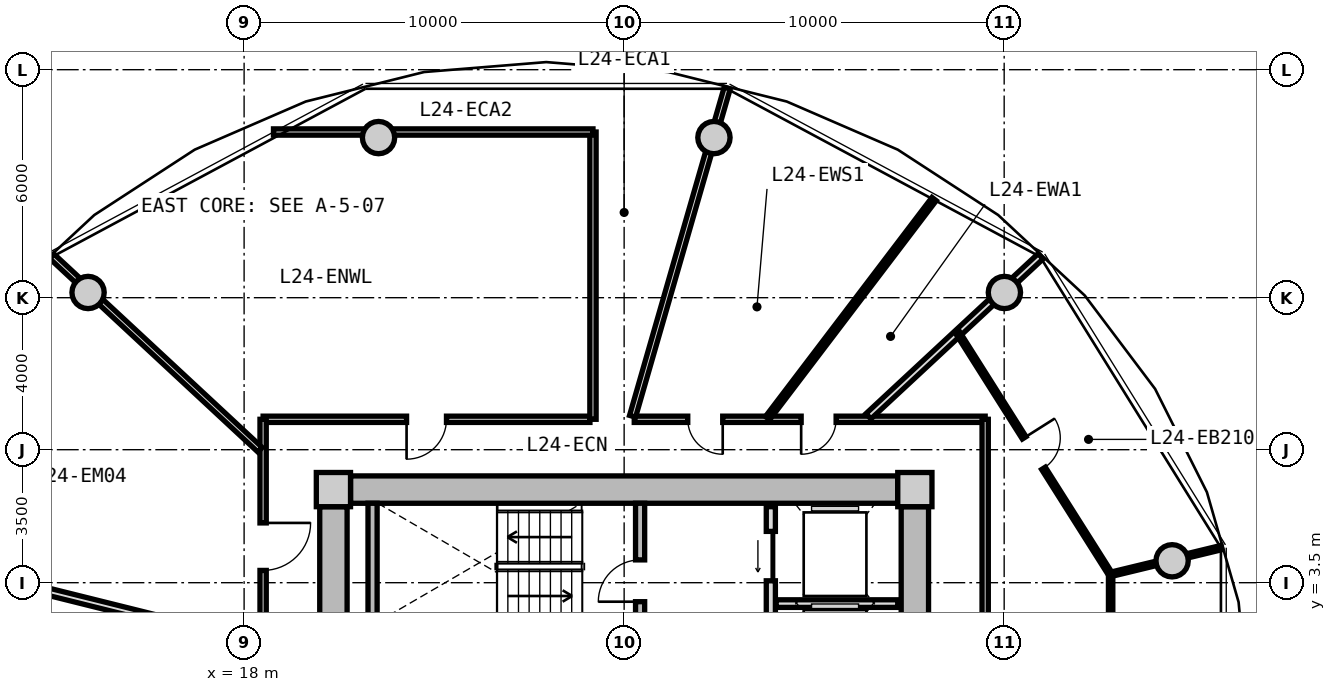
"""IFC4 building model, lengths in metres.
Left out: names, types, materials, properties, quantities, classifications, styles, units other than length and angle.
Written with IfcOpenShell. Run it as: python <this file> out.ifc"""

import sys

from ifc_helpers import new_model, si_unit, direction, frame, frame_2d, origin, origin_2d, place, context, subcontext, project, spatial, rectangle, circle, extrude, source, transform, mapped, element, fill, save


model = new_model("IFC4")
c1 = context("Model", 3, precision=1e-05, world=origin(), true_north=direction((0.0, 1.0)))
c2 = subcontext(c1, "Body", "Model", "MODEL_VIEW")
j1 = project(units=[si_unit("LENGTHUNIT", "METRE"), si_unit("PLANEANGLEUNIT", "RADIAN")], contexts=[c1])
p1 = place(None, origin())
s1 = spatial("IfcSite", under=j1, at=p1, CompositionType="ELEMENT")
p2 = place(p1, origin())
s2 = spatial("IfcBuilding", under=s1, at=p2, CompositionType="ELEMENT")
p3 = place(p2, frame((0.0, 0.0, 81.0)))
s3 = spatial("IfcBuildingStorey", under=s2, at=p3, CompositionType="ELEMENT", Elevation=81.0)
m1 = source(origin(), c2, "Body", "SweptSolid", [
    extrude(rectangle(XDim=0.9, YDim=0.9, at=origin_2d()), origin(), (0.0, 0.0, 1.0), 3.05),
])
for number, where, z_axis, x_axis in (
    (1, (35.65, 5.95, 0.0), (0.0, 0.0, 1.0), (1.0, 0.0, 0.0)),
    (2, (20.35, 5.95, 0.0), (0.0, 0.0, 1.0), (1.0, 0.0, 0.0)),
):
    element("IfcColumn", number, at=place(p3, frame(where, z_axis=z_axis, x_axis=x_axis)), inside=s3, PredefinedType="COLUMN", context=c2, shape_type="MappedRepresentation", body=[
        mapped(m1, transform((0.0, 0.0, 0.0), x_axis=(1.0, 0.0, 0.0), y_axis=(0.0, 1.0, 0.0), z_axis=(0.0, 0.0, 1.0), scale=1.0)),
    ])
m2 = source(origin(), c2, "Body", "SweptSolid", [
    extrude(rectangle(XDim=14.4, YDim=0.72, at=frame_2d((7.2, 0.0))), origin(), (0.0, 0.0, 1.0), 2.79),
])
p4 = place(p3, frame((20.8, 5.95, 0.0), z_axis=(0.0, 0.0, 1.0), x_axis=(1.0, 0.0, 0.0)))
e3 = element("IfcWall", 3, at=p4, inside=s3, PredefinedType="SHEAR", context=c2, shape_type="MappedRepresentation", body=[
    mapped(m2, transform((0.0, 0.0, 0.0), x_axis=(1.0, 0.0, 0.0), y_axis=(0.0, 1.0, 0.0), z_axis=(0.0, 0.0, 1.0), scale=1.0)),
])
m3 = source(origin(), c2, "Body", "SweptSolid", [
    extrude(rectangle(XDim=11.0, YDim=0.72, at=frame_2d((5.5, 0.0))), origin(), (0.0, 0.0, 1.0), 2.79),
])
p5 = place(p3, frame((20.35, -5.5, 0.0), z_axis=(0.0, 0.0, 1.0), x_axis=(0.0, 1.0, 0.0)))
e4 = element("IfcWall", 4, at=p5, inside=s3, PredefinedType="SHEAR", context=c2, shape_type="MappedRepresentation", body=[
    mapped(m3, transform((0.0, 0.0, 0.0), x_axis=(1.0, 0.0, 0.0), y_axis=(0.0, 1.0, 0.0), z_axis=(0.0, 0.0, 1.0), scale=1.0)),
])
p6 = place(p5, frame((3.8, 0.0, 0.0)))
e5 = element("IfcOpeningElement", 5, at=p6, cuts=e4, PredefinedType="OPENING", context=c2, shape_type="SweptSolid", body=[
    extrude(rectangle(XDim=1.2, YDim=2.15, at=frame_2d((0.6, 1.075))), frame((0.0, 0.37, 0.0), z_axis=(0.0, -1.0, 0.0), x_axis=(1.0, 0.0, 0.0)), (0.0, 0.0, 1.0), 0.74),
])
p7 = place(p3, frame((35.65, 5.5, 0.0), z_axis=(0.0, 0.0, 1.0), x_axis=(0.0, -1.0, 0.0)))
e6 = element("IfcWall", 6, at=p7, inside=s3, PredefinedType="SHEAR", context=c2, shape_type="MappedRepresentation", body=[
    mapped(m3, transform((0.0, 0.0, 0.0), x_axis=(1.0, 0.0, 0.0), y_axis=(0.0, 1.0, 0.0), z_axis=(0.0, 0.0, 1.0), scale=1.0)),
])
p8 = place(p7, frame((5.65, 0.0, 0.0)))
e7 = element("IfcOpeningElement", 7, at=p8, cuts=e6, PredefinedType="OPENING", context=c2, shape_type="SweptSolid", body=[
    extrude(rectangle(XDim=1.2, YDim=2.15, at=frame_2d((0.6, 1.075))), frame((0.0, 0.37, 0.0), z_axis=(0.0, -1.0, 0.0), x_axis=(1.0, 0.0, 0.0)), (0.0, 0.0, 1.0), 0.74),
])
m4 = source(origin(), c2, "Body", "SweptSolid", [
    extrude(circle(Radius=0.425, at=origin_2d()), origin(), (0.0, 0.0, 1.0), 3.05),
])
for number, where, z_axis, x_axis in (
    (8, (42.419, 4.076, 0.0), (0.0, 0.0, 1.0), (1.0, 0.0, 0.0)),
    (9, (38.006, 11.137, 0.0), (0.0, 0.0, 1.0), (1.0, 0.0, 0.0)),
    (10, (30.363, 15.213, 0.0), (0.0, 0.0, 1.0), (1.0, 0.0, 0.0)),
    (11, (21.537, 15.213, 0.0), (0.0, 0.0, 1.0), (1.0, 0.0, 0.0)),
    (12, (13.894, 11.137, 0.0), (0.0, 0.0, 1.0), (1.0, 0.0, 0.0)),
):
    element("IfcColumn", number, at=place(p3, frame(where, z_axis=z_axis, x_axis=x_axis)), inside=s3, PredefinedType="COLUMN", context=c2, shape_type="MappedRepresentation", body=[
        mapped(m4, transform((0.0, 0.0, 0.0), x_axis=(1.0, 0.0, 0.0), y_axis=(0.0, 1.0, 0.0), z_axis=(0.0, 0.0, 1.0), scale=1.0)),
    ])
m5 = source(origin(), c2, "Body", "SweptSolid", [
    extrude(rectangle(XDim=3.14, YDim=0.24, at=frame_2d((1.57, 0.0))), origin(), (0.0, 0.0, 1.0), 2.79),
])
p9 = place(p3, frame((21.38, 2.45, 0.0), z_axis=(0.0, 0.0, 1.0), x_axis=(0.0, 1.0, 0.0)))
e13 = element("IfcWall", 13, at=p9, inside=s3, PredefinedType="PARTITIONING", context=c2, shape_type="MappedRepresentation", body=[
    mapped(m5, transform((0.0, 0.0, 0.0), x_axis=(1.0, 0.0, 0.0), y_axis=(0.0, 1.0, 0.0), z_axis=(0.0, 0.0, 1.0), scale=1.0)),
])
p10 = place(p3, frame((28.42, 2.45, 0.0), z_axis=(0.0, 0.0, 1.0), x_axis=(0.0, 1.0, 0.0)))
e14 = element("IfcWall", 14, at=p10, inside=s3, PredefinedType="PARTITIONING", context=c2, shape_type="MappedRepresentation", body=[
    mapped(m5, transform((0.0, 0.0, 0.0), x_axis=(1.0, 0.0, 0.0), y_axis=(0.0, 1.0, 0.0), z_axis=(0.0, 0.0, 1.0), scale=1.0)),
])
p11 = place(p10, frame((0.55, 0.0, 0.0)))
e15 = element("IfcOpeningElement", 15, at=p11, cuts=e14, PredefinedType="OPENING", context=c2, shape_type="SweptSolid", body=[
    extrude(rectangle(XDim=1.1, YDim=2.15, at=frame_2d((0.55, 1.075))), frame((0.0, 0.13, 0.0), z_axis=(0.0, -1.0, 0.0), x_axis=(1.0, 0.0, 0.0)), (0.0, 0.0, 1.0), 0.26),
])
m6 = source(origin(), c2, "Body", "SweptSolid", [
    extrude(rectangle(XDim=5.0, YDim=0.24, at=frame_2d((2.5, 0.0))), origin(), (0.0, 0.0, 1.0), 2.775),
])
p12 = place(p3, frame((31.86, 0.5, 0.0), z_axis=(0.0, 0.0, 1.0), x_axis=(0.0, 1.0, 0.0)))
e16 = element("IfcWall", 16, at=p12, inside=s3, PredefinedType="PARTITIONING", context=c2, shape_type="MappedRepresentation", body=[
    mapped(m6, transform((0.0, 0.0, 0.0), x_axis=(1.0, 0.0, 0.0), y_axis=(0.0, 1.0, 0.0), z_axis=(0.0, 0.0, 1.0), scale=1.0)),
])
p13 = place(p12, frame((3.05, 0.0, 0.0)))
e17 = element("IfcOpeningElement", 17, at=p13, cuts=e16, PredefinedType="OPENING", context=c2, shape_type="SweptSolid", body=[
    extrude(rectangle(XDim=1.3, YDim=2.2, at=frame_2d((0.65, 1.1))), frame((0.0, 0.13, 0.0), z_axis=(0.0, -1.0, 0.0), x_axis=(1.0, 0.0, 0.0)), (0.0, 0.0, 1.0), 0.26),
])
p14 = place(p12, frame((0.55, 0.0, 0.0)))
e18 = element("IfcOpeningElement", 18, at=p14, cuts=e16, PredefinedType="OPENING", context=c2, shape_type="SweptSolid", body=[
    extrude(rectangle(XDim=1.3, YDim=2.2, at=frame_2d((0.65, 1.1))), frame((0.0, 0.13, 0.0), z_axis=(0.0, -1.0, 0.0), x_axis=(1.0, 0.0, 0.0)), (0.0, 0.0, 1.0), 0.26),
])
m7 = source(origin(), c2, "Body", "SweptSolid", [
    extrude(rectangle(XDim=3.2, YDim=0.2, at=frame_2d((1.6, 0.0))), origin(), (0.0, 0.0, 1.0), 2.775),
])
p15 = place(p3, frame((32.0, 2.95, 0.0), z_axis=(0.0, 0.0, 1.0), x_axis=(1.0, 0.0, 0.0)))
e19 = element("IfcWall", 19, at=p15, inside=s3, PredefinedType="PARTITIONING", context=c2, shape_type="MappedRepresentation", body=[
    mapped(m7, transform((0.0, 0.0, 0.0), x_axis=(1.0, 0.0, 0.0), y_axis=(0.0, 1.0, 0.0), z_axis=(0.0, 0.0, 1.0), scale=1.0)),
])
m8 = source(origin(), c2, "Body", "SweptSolid", [
    extrude(rectangle(XDim=8.6, YDim=0.165, at=frame_2d((4.3, 0.0))), origin(), (0.0, 0.0, 1.0), 2.775),
])
p16 = place(p3, frame((18.5, 7.8, 0.0), z_axis=(0.0, 0.0, 1.0), x_axis=(1.0, 0.0, 0.0)))
e20 = element("IfcWall", 20, at=p16, inside=s3, PredefinedType="PARTITIONING", context=c2, shape_type="MappedRepresentation", body=[
    mapped(m8, transform((0.0, 0.0, 0.0), x_axis=(1.0, 0.0, 0.0), y_axis=(0.0, 1.0, 0.0), z_axis=(0.0, 0.0, 1.0), scale=1.0)),
])
p17 = place(p16, frame((3.775, 0.0, 0.0)))
e21 = element("IfcOpeningElement", 21, at=p17, cuts=e20, PredefinedType="OPENING", context=c2, shape_type="SweptSolid", body=[
    extrude(rectangle(XDim=1.05, YDim=2.15, at=frame_2d((0.525, 1.075))), frame((0.0, 0.093, 0.0), z_axis=(0.0, -1.0, 0.0), x_axis=(1.0, 0.0, 0.0)), (0.0, 0.0, 1.0), 0.185),
])
m9 = source(origin(), c2, "Body", "SweptSolid", [
    extrude(rectangle(XDim=9.234, YDim=0.165, at=frame_2d((4.617, 0.0))), origin(), (0.0, 0.0, 1.0), 2.775),
])
p18 = place(p3, frame((28.266, 7.8, 0.0), z_axis=(0.0, 0.0, 1.0), x_axis=(1.0, 0.0, 0.0)))
e22 = element("IfcWall", 22, at=p18, inside=s3, PredefinedType="PARTITIONING", context=c2, shape_type="MappedRepresentation", body=[
    mapped(m9, transform((0.0, 0.0, 0.0), x_axis=(1.0, 0.0, 0.0), y_axis=(0.0, 1.0, 0.0), z_axis=(0.0, 0.0, 1.0), scale=1.0)),
])
p19 = place(p18, frame((4.392, 0.0, 0.0)))
e23 = element("IfcOpeningElement", 23, at=p19, cuts=e22, PredefinedType="OPENING", context=c2, shape_type="SweptSolid", body=[
    extrude(rectangle(XDim=0.92, YDim=2.1, at=frame_2d((0.46, 1.05))), frame((0.0, 0.093, 0.0), z_axis=(0.0, -1.0, 0.0), x_axis=(1.0, 0.0, 0.0)), (0.0, 0.0, 1.0), 0.185),
])
p20 = place(p18, frame((1.408, 0.0, 0.0)))
e24 = element("IfcOpeningElement", 24, at=p20, cuts=e22, PredefinedType="OPENING", context=c2, shape_type="SweptSolid", body=[
    extrude(rectangle(XDim=0.92, YDim=2.1, at=frame_2d((0.46, 1.05))), frame((0.0, 0.093, 0.0), z_axis=(0.0, -1.0, 0.0), x_axis=(1.0, 0.0, 0.0)), (0.0, 0.0, 1.0), 0.185),
])
m10 = source(origin(), c2, "Body", "SweptSolid", [
    extrude(rectangle(XDim=15.6, YDim=0.165, at=frame_2d((7.8, 0.0))), origin(), (0.0, 0.0, 1.0), 2.775),
])
p21 = place(p3, frame((18.5, -7.8, 0.0), z_axis=(0.0, 0.0, 1.0), x_axis=(0.0, 1.0, 0.0)))
e25 = element("IfcWall", 25, at=p21, inside=s3, PredefinedType="PARTITIONING", context=c2, shape_type="MappedRepresentation", body=[
    mapped(m10, transform((0.0, 0.0, 0.0), x_axis=(1.0, 0.0, 0.0), y_axis=(0.0, 1.0, 0.0), z_axis=(0.0, 0.0, 1.0), scale=1.0)),
])
p22 = place(p21, frame((11.623, 0.0, 0.0)))
e26 = element("IfcOpeningElement", 26, at=p22, cuts=e25, PredefinedType="OPENING", context=c2, shape_type="SweptSolid", body=[
    extrude(rectangle(XDim=1.25, YDim=2.2, at=frame_2d((0.625, 1.1))), frame((0.0, 0.093, 0.0), z_axis=(0.0, -1.0, 0.0), x_axis=(1.0, 0.0, 0.0)), (0.0, 0.0, 1.0), 0.185),
])
p23 = place(p21, frame((7.175, 0.0, 0.0)))
e27 = element("IfcOpeningElement", 27, at=p23, cuts=e25, PredefinedType="OPENING", context=c2, shape_type="SweptSolid", body=[
    extrude(rectangle(XDim=1.25, YDim=2.2, at=frame_2d((0.625, 1.1))), frame((0.0, 0.093, 0.0), z_axis=(0.0, -1.0, 0.0), x_axis=(1.0, 0.0, 0.0)), (0.0, 0.0, 1.0), 0.185),
])
p24 = place(p3, frame((37.5, 7.8, 0.0), z_axis=(0.0, 0.0, 1.0), x_axis=(0.0, -1.0, 0.0)))
e28 = element("IfcWall", 28, at=p24, inside=s3, PredefinedType="PARTITIONING", context=c2, shape_type="MappedRepresentation", body=[
    mapped(m10, transform((0.0, 0.0, 0.0), x_axis=(1.0, 0.0, 0.0), y_axis=(0.0, 1.0, 0.0), z_axis=(0.0, 0.0, 1.0), scale=1.0)),
])
p25 = place(p24, frame((6.87, 0.0, 0.0)))
e29 = element("IfcOpeningElement", 29, at=p25, cuts=e28, PredefinedType="OPENING", context=c2, shape_type="SweptSolid", body=[
    extrude(rectangle(XDim=1.05, YDim=2.15, at=frame_2d((0.525, 1.075))), frame((0.0, 0.093, 0.0), z_axis=(0.0, -1.0, 0.0), x_axis=(1.0, 0.0, 0.0)), (0.0, 0.0, 1.0), 0.185),
])
m11 = source(origin(), c2, "Body", "SweptSolid", [
    extrude(rectangle(XDim=8.989, YDim=0.165, at=frame_2d((4.495, 0.0))), origin(), (0.0, 0.0, 1.0), 2.275),
])
p26 = place(p3, frame((28.222, 7.88, 0.0), z_axis=(0.0, 0.0, 1.0), x_axis=(0.27702323008, 0.960863221274, 0.0)))
e30 = element("IfcWall", 30, at=p26, inside=s3, PredefinedType="PARTITIONING", context=c2, shape_type="MappedRepresentation", body=[
    mapped(m11, transform((0.0, 0.0, 0.0), x_axis=(1.0, 0.0, 0.0), y_axis=(0.0, 1.0, 0.0), z_axis=(0.0, 0.0, 1.0), scale=1.0)),
])
m12 = source(origin(), c2, "Body", "SweptSolid", [
    extrude(rectangle(XDim=7.482, YDim=0.165, at=frame_2d((3.741, 0.0))), origin(), (0.0, 0.0, 1.0), 2.275),
])
p27 = place(p3, frame((18.42, 6.998, 0.0), z_axis=(0.0, 0.0, 1.0), x_axis=(-0.732508698043, 0.680757671489, 0.0)))
e31 = element("IfcWall", 31, at=p27, inside=s3, PredefinedType="PARTITIONING", context=c2, shape_type="MappedRepresentation", body=[
    mapped(m12, transform((0.0, 0.0, 0.0), x_axis=(1.0, 0.0, 0.0), y_axis=(0.0, 1.0, 0.0), z_axis=(0.0, 0.0, 1.0), scale=1.0)),
])
m13 = source(origin(), c2, "Body", "SweptSolid", [
    extrude(rectangle(XDim=7.56, YDim=0.165, at=frame_2d((3.78, 0.0))), origin(), (0.0, 0.0, 1.0), 2.775),
])
p28 = place(p3, frame((27.18, 7.8, 0.0), z_axis=(0.0, 0.0, 1.0), x_axis=(0.0, 1.0, 0.0)))
e32 = element("IfcWall", 32, at=p28, inside=s3, PredefinedType="PARTITIONING", context=c2, shape_type="MappedRepresentation", body=[
    mapped(m13, transform((0.0, 0.0, 0.0), x_axis=(1.0, 0.0, 0.0), y_axis=(0.0, 1.0, 0.0), z_axis=(0.0, 0.0, 1.0), scale=1.0)),
])
m14 = source(origin(), c2, "Body", "SweptSolid", [
    extrude(rectangle(XDim=8.407, YDim=0.165, at=frame_2d((4.204, 0.0))), origin(), (0.0, 0.0, 1.0), 2.275),
])
p29 = place(p3, frame((18.773, 15.36, 0.0), z_axis=(0.0, 0.0, 1.0), x_axis=(1.0, 0.0, 0.0)))
e33 = element("IfcWall", 33, at=p29, inside=s3, PredefinedType="PARTITIONING", context=c2, shape_type="MappedRepresentation", body=[
    mapped(m14, transform((0.0, 0.0, 0.0), x_axis=(1.0, 0.0, 0.0), y_axis=(0.0, 1.0, 0.0), z_axis=(0.0, 0.0, 1.0), scale=1.0)),
])
m15 = source(origin(), c2, "Body", "SweptSolid", [
    extrude(rectangle(XDim=10.556, YDim=0.19, at=frame_2d((5.278, 0.0))), origin(), (0.0, 0.0, 1.0), 2.275),
])
p30 = place(p3, frame((18.42, 1.875, 0.0), z_axis=(0.0, 0.0, 1.0), x_axis=(-0.970363857851, 0.241648470667, 0.0)))
e34 = element("IfcWall", 34, at=p30, inside=s3, PredefinedType="PARTITIONING", context=c2, shape_type="MappedRepresentation", body=[
    mapped(m15, transform((0.0, 0.0, 0.0), x_axis=(1.0, 0.0, 0.0), y_axis=(0.0, 1.0, 0.0), z_axis=(0.0, 0.0, 1.0), scale=1.0)),
])
m16 = source(origin(), c2, "Body", "SweptSolid", [
    extrude(rectangle(XDim=6.187, YDim=0.19, at=frame_2d((3.093, 0.0))), origin(), (0.0, 0.0, 1.0), 2.275),
])
p31 = place(p3, frame((34.429, 7.88, 0.0), z_axis=(0.0, 0.0, 1.0), x_axis=(0.732501077882, 0.680765870841, 0.0)))
e35 = element("IfcWall", 35, at=p31, inside=s3, PredefinedType="PARTITIONING", context=c2, shape_type="MappedRepresentation", body=[
    mapped(m16, transform((0.0, 0.0, 0.0), x_axis=(1.0, 0.0, 0.0), y_axis=(0.0, 1.0, 0.0), z_axis=(0.0, 0.0, 1.0), scale=1.0)),
])
m17 = source(origin(), c2, "Body", "SweptSolid", [
    extrude(rectangle(XDim=7.438, YDim=0.115, at=frame_2d((3.719, 0.0))), origin(), (0.0, 0.0, 1.0), 2.775),
])
p32 = place(p3, frame((40.801, -3.719, 0.0), z_axis=(0.0, 0.0, 1.0), x_axis=(0.0, 1.0, 0.0)))
e36 = element("IfcWall", 36, at=p32, inside=s3, PredefinedType="PARTITIONING", context=c2, shape_type="MappedRepresentation", body=[
    mapped(m17, transform((0.0, 0.0, 0.0), x_axis=(1.0, 0.0, 0.0), y_axis=(0.0, 1.0, 0.0), z_axis=(0.0, 0.0, 1.0), scale=1.0)),
])
p33 = place(p32, frame((3.244, 0.0, 0.0)))
e37 = element("IfcOpeningElement", 37, at=p33, cuts=e36, PredefinedType="OPENING", context=c2, shape_type="SweptSolid", body=[
    extrude(rectangle(XDim=0.95, YDim=2.1, at=frame_2d((0.475, 1.05))), frame((0.0, 0.067, 0.0), z_axis=(0.0, -1.0, 0.0), x_axis=(1.0, 0.0, 0.0)), (0.0, 0.0, 1.0), 0.135),
])
m18 = source(origin(), c2, "Body", "SweptSolid", [
    extrude(rectangle(XDim=7.555, YDim=0.115, at=frame_2d((3.777, 0.0))), origin(), (0.0, 0.0, 1.0), 2.775),
])
p34 = place(p3, frame((40.8, 3.718, 0.0), z_axis=(0.0, 0.0, 1.0), x_axis=(-0.534546095992, 0.845139320621, 0.0)))
e38 = element("IfcWall", 38, at=p34, inside=s3, PredefinedType="PARTITIONING", context=c2, shape_type="MappedRepresentation", body=[
    mapped(m18, transform((0.0, 0.0, 0.0), x_axis=(1.0, 0.0, 0.0), y_axis=(0.0, 1.0, 0.0), z_axis=(0.0, 0.0, 1.0), scale=1.0)),
])
p35 = place(p34, frame((3.302, 0.0, 0.0)))
e39 = element("IfcOpeningElement", 39, at=p35, cuts=e38, PredefinedType="OPENING", context=c2, shape_type="SweptSolid", body=[
    extrude(rectangle(XDim=0.95, YDim=2.1, at=frame_2d((0.475, 1.05))), frame((0.0, 0.067, 0.0), z_axis=(0.0, -1.0, 0.0), x_axis=(1.0, 0.0, 0.0)), (0.0, 0.0, 1.0), 0.135),
])
m19 = source(origin(), c2, "Body", "SweptSolid", [
    extrude(rectangle(XDim=3.008, YDim=0.115, at=frame_2d((1.504, 0.0))), origin(), (0.0, 0.0, 1.0), 2.275),
])
p36 = place(p3, frame((40.8, 3.718, 0.0), z_axis=(0.0, 0.0, 1.0), x_axis=(0.971939021518, 0.235232945078, 0.0)))
e40 = element("IfcWall", 40, at=p36, inside=s3, PredefinedType="PARTITIONING", context=c2, shape_type="MappedRepresentation", body=[
    mapped(m19, transform((0.0, 0.0, 0.0), x_axis=(1.0, 0.0, 0.0), y_axis=(0.0, 1.0, 0.0), z_axis=(0.0, 0.0, 1.0), scale=1.0)),
])
m20 = source(origin(), c2, "Body", "SweptSolid", [
    extrude(rectangle(XDim=7.243, YDim=0.14, at=frame_2d((3.621, 0.0))), origin(), (0.0, 0.0, 1.0), 2.775),
])
p37 = place(p3, frame((31.774, 7.83, 0.0), z_axis=(0.0, 0.0, 1.0), x_axis=(0.605111472002, 0.796140757939, 0.0)))
e41 = element("IfcWall", 41, at=p37, inside=s3, PredefinedType="PARTITIONING", context=c2, shape_type="MappedRepresentation", body=[
    mapped(m20, transform((0.0, 0.0, 0.0), x_axis=(1.0, 0.0, 0.0), y_axis=(0.0, 1.0, 0.0), z_axis=(0.0, 0.0, 1.0), scale=1.0)),
])
m21 = source(origin(), c2, "Body", "SweptSolid", [
    extrude(rectangle(XDim=1.1, YDim=2.15, at=frame_2d((0.55, 1.075))), frame((0.0, 0.025, 0.0), z_axis=(0.0, -1.0, 0.0), x_axis=(1.0, 0.0, 0.0)), (0.0, 0.0, 1.0), 0.05),
])
p38 = place(p11, origin())
e42 = element("IfcDoor", 42, at=p38, inside=s3, OperationType="SINGLE_SWING_LEFT", PredefinedType="DOOR", context=c2, shape_type="MappedRepresentation", body=[
    mapped(m21, transform((0.0, 0.0, 0.0), x_axis=(1.0, 0.0, 0.0), y_axis=(0.0, 1.0, 0.0), z_axis=(0.0, 0.0, 1.0), scale=1.0)),
])
fill(e15, e42)
m22 = source(origin(), c2, "Body", "SweptSolid", [
    extrude(rectangle(XDim=1.3, YDim=2.2, at=frame_2d((0.65, 1.1))), frame((0.0, 0.025, 0.0), z_axis=(0.0, -1.0, 0.0), x_axis=(1.0, 0.0, 0.0)), (0.0, 0.0, 1.0), 0.05),
])
p39 = place(p13, origin())
e43 = element("IfcDoor", 43, at=p39, inside=s3, OperationType="SLIDING_TO_LEFT", PredefinedType="DOOR", context=c2, shape_type="MappedRepresentation", body=[
    mapped(m22, transform((0.0, 0.0, 0.0), x_axis=(1.0, 0.0, 0.0), y_axis=(0.0, 1.0, 0.0), z_axis=(0.0, 0.0, 1.0), scale=1.0)),
])
fill(e17, e43)
m23 = source(origin(), c2, "Body", "SweptSolid", [
    extrude(rectangle(XDim=1.05, YDim=2.15, at=frame_2d((0.525, 1.075))), frame((0.0, 0.025, 0.0), z_axis=(0.0, -1.0, 0.0), x_axis=(1.0, 0.0, 0.0)), (0.0, 0.0, 1.0), 0.05),
])
p40 = place(p17, frame((1.05, 0.0, 0.0), z_axis=(0.0, 0.0, 1.0), x_axis=(-1.0, 0.0, 0.0)))
e44 = element("IfcDoor", 44, at=p40, inside=s3, OperationType="SINGLE_SWING_RIGHT", PredefinedType="DOOR", context=c2, shape_type="MappedRepresentation", body=[
    mapped(m23, transform((0.0, 0.0, 0.0), x_axis=(1.0, 0.0, 0.0), y_axis=(0.0, 1.0, 0.0), z_axis=(0.0, 0.0, 1.0), scale=1.0)),
])
fill(e21, e44)
m24 = source(origin(), c2, "Body", "SweptSolid", [
    extrude(rectangle(XDim=1.25, YDim=2.2, at=frame_2d((0.625, 1.1))), frame((0.0, 0.025, 0.0), z_axis=(0.0, -1.0, 0.0), x_axis=(1.0, 0.0, 0.0)), (0.0, 0.0, 1.0), 0.05),
])
p41 = place(p22, frame((1.25, 0.0, 0.0), z_axis=(0.0, 0.0, 1.0), x_axis=(-1.0, 0.0, 0.0)))
e45 = element("IfcDoor", 45, at=p41, inside=s3, OperationType="SINGLE_SWING_LEFT", PredefinedType="DOOR", context=c2, shape_type="MappedRepresentation", body=[
    mapped(m24, transform((0.0, 0.0, 0.0), x_axis=(1.0, 0.0, 0.0), y_axis=(0.0, 1.0, 0.0), z_axis=(0.0, 0.0, 1.0), scale=1.0)),
])
fill(e26, e45)
m25 = source(origin(), c2, "Body", "SweptSolid", [
    extrude(rectangle(XDim=0.95, YDim=2.1, at=frame_2d((0.475, 1.05))), frame((0.0, 0.025, 0.0), z_axis=(0.0, -1.0, 0.0), x_axis=(1.0, 0.0, 0.0)), (0.0, 0.0, 1.0), 0.05),
])
p42 = place(p35, frame((0.95, 0.0, 0.0), z_axis=(0.0, 0.0, 1.0), x_axis=(-1.0, 0.0, 0.0)))
e46 = element("IfcDoor", 46, at=p42, inside=s3, OperationType="SINGLE_SWING_LEFT", PredefinedType="DOOR", context=c2, shape_type="MappedRepresentation", body=[
    mapped(m25, transform((0.0, 0.0, 0.0), x_axis=(1.0, 0.0, 0.0), y_axis=(0.0, 1.0, 0.0), z_axis=(0.0, 0.0, 1.0), scale=1.0)),
])
fill(e39, e46)
m26 = source(origin(), c2, "Body", "SweptSolid", [
    extrude(rectangle(XDim=0.92, YDim=2.1, at=frame_2d((0.46, 1.05))), frame((0.0, 0.025, 0.0), z_axis=(0.0, -1.0, 0.0), x_axis=(1.0, 0.0, 0.0)), (0.0, 0.0, 1.0), 0.05),
])
p43 = place(p19, frame((0.92, 0.0, 0.0), z_axis=(0.0, 0.0, 1.0), x_axis=(-1.0, 0.0, 0.0)))
e47 = element("IfcDoor", 47, at=p43, inside=s3, OperationType="SINGLE_SWING_RIGHT", PredefinedType="DOOR", context=c2, shape_type="MappedRepresentation", body=[
    mapped(m26, transform((0.0, 0.0, 0.0), x_axis=(1.0, 0.0, 0.0), y_axis=(0.0, 1.0, 0.0), z_axis=(0.0, 0.0, 1.0), scale=1.0)),
])
fill(e23, e47)
p44 = place(p20, frame((0.92, 0.0, 0.0), z_axis=(0.0, 0.0, 1.0), x_axis=(-1.0, 0.0, 0.0)))
e48 = element("IfcDoor", 48, at=p44, inside=s3, OperationType="SINGLE_SWING_LEFT", PredefinedType="DOOR", context=c2, shape_type="MappedRepresentation", body=[
    mapped(m26, transform((0.0, 0.0, 0.0), x_axis=(1.0, 0.0, 0.0), y_axis=(0.0, 1.0, 0.0), z_axis=(0.0, 0.0, 1.0), scale=1.0)),
])
fill(e24, e48)
save(model, sys.argv[1])
